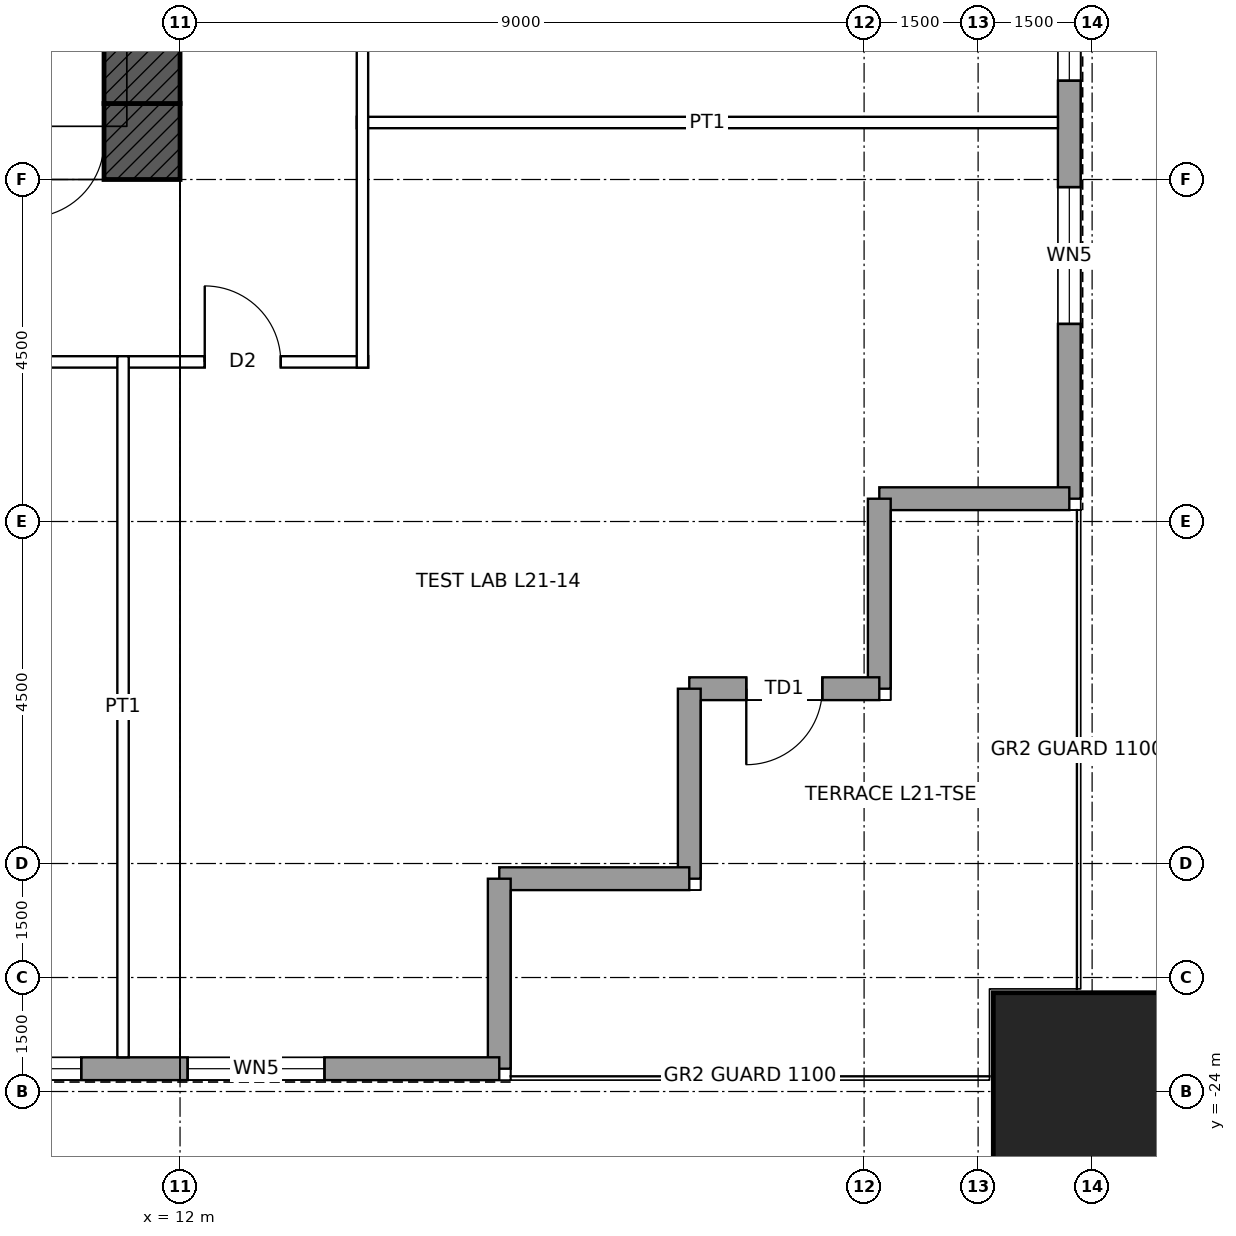
"""IFC4 building model, lengths in metres.
Left out: names, types, materials, properties, quantities, classifications, styles, units other than length and angle.
Written with IfcOpenShell. Run it as: python <this file> out.ifc"""

import sys

from ifc_helpers import new_model, si_unit, direction, frame, frame_2d, origin, origin_2d, place, context, subcontext, project, spatial, rectangle, hollow_rectangle, extrude, element, fill, save


model = new_model("IFC4")
c1 = context("Model", 3, precision=1e-05, world=origin(), true_north=direction((0.0, 1.0)))
c2 = subcontext(c1, "Body", "Model", "MODEL_VIEW")
j1 = project(units=[si_unit("LENGTHUNIT", "METRE"), si_unit("PLANEANGLEUNIT", "RADIAN")], contexts=[c1])
p1 = place(None, origin())
s1 = spatial("IfcSite", under=j1, at=p1, CompositionType="ELEMENT")
p2 = place(p1, origin())
s2 = spatial("IfcBuilding", under=s1, at=p2, CompositionType="ELEMENT")
p3 = place(p2, frame((0.0, 0.0, 108.9)))
s3 = spatial("IfcBuildingStorey", under=s2, at=p3, CompositionType="ELEMENT", Elevation=108.9)
p4 = place(p3, frame((24.0, -24.0, 0.0), z_axis=(0.0, 0.0, 1.0), x_axis=(1.0, 0.0, 0.0)))
e1 = element("IfcColumn", 1, at=p4, inside=s3, PredefinedType="COLUMN", context=c2, shape_type="SweptSolid", body=[
    extrude(hollow_rectangle(XDim=2.6, YDim=2.6, WallThickness=0.13, at=origin_2d()), origin(), (0.0, 0.0, 1.0), 4.5),
])
p5 = place(p3, frame((12.0, -11.5, 0.0), z_axis=(0.0, 0.0, 1.0), x_axis=(-1.0, 0.0, 0.0)))
e2 = element("IfcWall", 2, at=p5, inside=s3, PredefinedType="SHEAR", context=c2, shape_type="SweptSolid", body=[
    extrude(rectangle(XDim=24.0, YDim=1.0, at=frame_2d((12.0, 0.0))), origin(), (0.0, 0.0, 1.0), 4.5),
])
p6 = place(p5, frame((11.5, 0.0, 0.0)))
e3 = element("IfcOpeningElement", 3, at=p6, cuts=e2, PredefinedType="OPENING", context=c2, shape_type="SweptSolid", body=[
    extrude(rectangle(XDim=1.0, YDim=2.1, at=frame_2d((0.5, 1.05))), frame((0.0, 0.51, 0.0), z_axis=(0.0, -1.0, 0.0), x_axis=(1.0, 0.0, 0.0)), (0.0, 0.0, 1.0), 1.02),
])
p7 = place(p5, frame((1.0, 0.0, 0.0)))
e4 = element("IfcOpeningElement", 4, at=p7, cuts=e2, PredefinedType="OPENING", context=c2, shape_type="SweptSolid", body=[
    extrude(rectangle(XDim=1.0, YDim=2.4, at=frame_2d((0.5, 1.2))), frame((0.0, 0.51, 0.0), z_axis=(0.0, -1.0, 0.0), x_axis=(1.0, 0.0, 0.0)), (0.0, 0.0, 1.0), 1.02),
])
p8 = place(p3, frame((11.5, 11.0, 0.0), z_axis=(0.0, 0.0, 1.0), x_axis=(0.0, -1.0, 0.0)))
e5 = element("IfcWall", 5, at=p8, inside=s3, PredefinedType="SHEAR", context=c2, shape_type="SweptSolid", body=[
    extrude(rectangle(XDim=22.0, YDim=1.0, at=frame_2d((11.0, 0.0))), origin(), (0.0, 0.0, 1.0), 4.5),
])
p9 = place(p8, frame((10.5, 0.0, 0.0)))
e6 = element("IfcOpeningElement", 6, at=p9, cuts=e5, PredefinedType="OPENING", context=c2, shape_type="SweptSolid", body=[
    extrude(rectangle(XDim=1.0, YDim=2.4, at=frame_2d((0.5, 1.2))), frame((0.0, 0.51, 0.0), z_axis=(0.0, -1.0, 0.0), x_axis=(1.0, 0.0, 0.0)), (0.0, 0.0, 1.0), 1.02),
])
p10 = place(p3, frame((23.7, 16.2, 0.0), z_axis=(0.0, 0.0, 1.0), x_axis=(0.0, -1.0, 0.0)))
e7 = element("IfcWall", 7, at=p10, inside=s3, PredefinedType="SOLIDWALL", context=c2, shape_type="SweptSolid", body=[
    extrude(rectangle(XDim=32.4, YDim=0.3, at=frame_2d((16.2, 0.0))), origin(), (0.0, 0.0, 1.0), 4.3),
])
p11 = place(p10, frame((2.3, 0.0, 1.0)))
e8 = element("IfcOpeningElement", 8, at=p11, cuts=e7, PredefinedType="OPENING", context=c2, shape_type="SweptSolid", body=[
    extrude(rectangle(XDim=1.8, YDim=1.2, at=frame_2d((0.9, 0.6))), frame((0.0, 0.16, 0.0), z_axis=(0.0, -1.0, 0.0), x_axis=(1.0, 0.0, 0.0)), (0.0, 0.0, 1.0), 0.32),
])
p12 = place(p10, frame((5.5, 0.0, 1.0)))
e9 = element("IfcOpeningElement", 9, at=p12, cuts=e7, PredefinedType="OPENING", context=c2, shape_type="SweptSolid", body=[
    extrude(rectangle(XDim=2.4, YDim=1.2, at=frame_2d((1.2, 0.6))), frame((0.0, 0.16, 0.0), z_axis=(0.0, -1.0, 0.0), x_axis=(1.0, 0.0, 0.0)), (0.0, 0.0, 1.0), 0.32),
])
p13 = place(p10, frame((9.5, 0.0, 1.0)))
e10 = element("IfcOpeningElement", 10, at=p13, cuts=e7, PredefinedType="OPENING", context=c2, shape_type="SweptSolid", body=[
    extrude(rectangle(XDim=2.4, YDim=1.2, at=frame_2d((1.2, 0.6))), frame((0.0, 0.16, 0.0), z_axis=(0.0, -1.0, 0.0), x_axis=(1.0, 0.0, 0.0)), (0.0, 0.0, 1.0), 0.32),
])
p14 = place(p10, frame((13.0, 0.0, 1.0)))
e11 = element("IfcOpeningElement", 11, at=p14, cuts=e7, PredefinedType="OPENING", context=c2, shape_type="SweptSolid", body=[
    extrude(rectangle(XDim=2.4, YDim=1.2, at=frame_2d((1.2, 0.6))), frame((0.0, 0.16, 0.0), z_axis=(0.0, -1.0, 0.0), x_axis=(1.0, 0.0, 0.0)), (0.0, 0.0, 1.0), 0.32),
])
p15 = place(p10, frame((17.0, 0.0, 1.0)))
e12 = element("IfcOpeningElement", 12, at=p15, cuts=e7, PredefinedType="OPENING", context=c2, shape_type="SweptSolid", body=[
    extrude(rectangle(XDim=2.4, YDim=1.2, at=frame_2d((1.2, 0.6))), frame((0.0, 0.16, 0.0), z_axis=(0.0, -1.0, 0.0), x_axis=(1.0, 0.0, 0.0)), (0.0, 0.0, 1.0), 0.32),
])
p16 = place(p10, frame((20.5, 0.0, 1.0)))
e13 = element("IfcOpeningElement", 13, at=p16, cuts=e7, PredefinedType="OPENING", context=c2, shape_type="SweptSolid", body=[
    extrude(rectangle(XDim=2.4, YDim=1.2, at=frame_2d((1.2, 0.6))), frame((0.0, 0.16, 0.0), z_axis=(0.0, -1.0, 0.0), x_axis=(1.0, 0.0, 0.0)), (0.0, 0.0, 1.0), 0.32),
])
p17 = place(p10, frame((24.5, 0.0, 1.0)))
e14 = element("IfcOpeningElement", 14, at=p17, cuts=e7, PredefinedType="OPENING", context=c2, shape_type="SweptSolid", body=[
    extrude(rectangle(XDim=2.4, YDim=1.2, at=frame_2d((1.2, 0.6))), frame((0.0, 0.16, 0.0), z_axis=(0.0, -1.0, 0.0), x_axis=(1.0, 0.0, 0.0)), (0.0, 0.0, 1.0), 0.32),
])
p18 = place(p10, frame((28.3, 0.0, 1.0)))
e15 = element("IfcOpeningElement", 15, at=p18, cuts=e7, PredefinedType="OPENING", context=c2, shape_type="SweptSolid", body=[
    extrude(rectangle(XDim=1.8, YDim=1.2, at=frame_2d((0.9, 0.6))), frame((0.0, 0.16, 0.0), z_axis=(0.0, -1.0, 0.0), x_axis=(1.0, 0.0, 0.0)), (0.0, 0.0, 1.0), 0.32),
])
for number, where, z_axis, x_axis in (
    (16, (23.7, -16.2, 0.0), (0.0, 0.0, 1.0), (-1.0, 0.0, 0.0)),
    (17, (21.2, -16.2, 0.0), (0.0, 0.0, 1.0), (0.0, -1.0, 0.0)),
):
    element("IfcWall", number, at=place(p3, frame(where, z_axis=z_axis, x_axis=x_axis)), inside=s3, PredefinedType="SOLIDWALL", context=c2, shape_type="SweptSolid", body=[
        extrude(rectangle(XDim=2.5, YDim=0.3, at=frame_2d((1.25, 0.0))), origin(), (0.0, 0.0, 1.0), 4.3),
    ])
p19 = place(p3, frame((21.2, -18.7, 0.0), z_axis=(0.0, 0.0, 1.0), x_axis=(-1.0, 0.0, 0.0)))
e18 = element("IfcWall", 18, at=p19, inside=s3, PredefinedType="SOLIDWALL", context=c2, shape_type="SweptSolid", body=[
    extrude(rectangle(XDim=2.5, YDim=0.3, at=frame_2d((1.25, 0.0))), origin(), (0.0, 0.0, 1.0), 4.3),
])
p20 = place(p19, frame((0.75, 0.0, 0.0)))
e19 = element("IfcOpeningElement", 19, at=p20, cuts=e18, PredefinedType="OPENING", context=c2, shape_type="SweptSolid", body=[
    extrude(rectangle(XDim=1.0, YDim=2.4, at=frame_2d((0.5, 1.2))), frame((0.0, 0.16, 0.0), z_axis=(0.0, -1.0, 0.0), x_axis=(1.0, 0.0, 0.0)), (0.0, 0.0, 1.0), 0.32),
])
for number, where, z_axis, x_axis in (
    (20, (18.7, -18.7, 0.0), (0.0, 0.0, 1.0), (0.0, -1.0, 0.0)),
    (21, (18.7, -21.2, 0.0), (0.0, 0.0, 1.0), (-1.0, 0.0, 0.0)),
    (22, (16.2, -21.2, 0.0), (0.0, 0.0, 1.0), (0.0, -1.0, 0.0)),
):
    element("IfcWall", number, at=place(p3, frame(where, z_axis=z_axis, x_axis=x_axis)), inside=s3, PredefinedType="SOLIDWALL", context=c2, shape_type="SweptSolid", body=[
        extrude(rectangle(XDim=2.5, YDim=0.3, at=frame_2d((1.25, 0.0))), origin(), (0.0, 0.0, 1.0), 4.3),
    ])
p21 = place(p3, frame((16.2, -23.7, 0.0), z_axis=(0.0, 0.0, 1.0), x_axis=(-1.0, 0.0, 0.0)))
e23 = element("IfcWall", 23, at=p21, inside=s3, PredefinedType="SOLIDWALL", context=c2, shape_type="SweptSolid", body=[
    extrude(rectangle(XDim=32.4, YDim=0.3, at=frame_2d((16.2, 0.0))), origin(), (0.0, 0.0, 1.0), 4.3),
])
p22 = place(p21, frame((2.3, 0.0, 1.0)))
e24 = element("IfcOpeningElement", 24, at=p22, cuts=e23, PredefinedType="OPENING", context=c2, shape_type="SweptSolid", body=[
    extrude(rectangle(XDim=1.8, YDim=1.2, at=frame_2d((0.9, 0.6))), frame((0.0, 0.16, 0.0), z_axis=(0.0, -1.0, 0.0), x_axis=(1.0, 0.0, 0.0)), (0.0, 0.0, 1.0), 0.32),
])
p23 = place(p21, frame((5.5, 0.0, 1.0)))
e25 = element("IfcOpeningElement", 25, at=p23, cuts=e23, PredefinedType="OPENING", context=c2, shape_type="SweptSolid", body=[
    extrude(rectangle(XDim=2.4, YDim=1.2, at=frame_2d((1.2, 0.6))), frame((0.0, 0.16, 0.0), z_axis=(0.0, -1.0, 0.0), x_axis=(1.0, 0.0, 0.0)), (0.0, 0.0, 1.0), 0.32),
])
p24 = place(p21, frame((9.5, 0.0, 1.0)))
e26 = element("IfcOpeningElement", 26, at=p24, cuts=e23, PredefinedType="OPENING", context=c2, shape_type="SweptSolid", body=[
    extrude(rectangle(XDim=2.4, YDim=1.2, at=frame_2d((1.2, 0.6))), frame((0.0, 0.16, 0.0), z_axis=(0.0, -1.0, 0.0), x_axis=(1.0, 0.0, 0.0)), (0.0, 0.0, 1.0), 0.32),
])
p25 = place(p21, frame((13.0, 0.0, 1.0)))
e27 = element("IfcOpeningElement", 27, at=p25, cuts=e23, PredefinedType="OPENING", context=c2, shape_type="SweptSolid", body=[
    extrude(rectangle(XDim=2.4, YDim=1.2, at=frame_2d((1.2, 0.6))), frame((0.0, 0.16, 0.0), z_axis=(0.0, -1.0, 0.0), x_axis=(1.0, 0.0, 0.0)), (0.0, 0.0, 1.0), 0.32),
])
p26 = place(p21, frame((17.0, 0.0, 1.0)))
e28 = element("IfcOpeningElement", 28, at=p26, cuts=e23, PredefinedType="OPENING", context=c2, shape_type="SweptSolid", body=[
    extrude(rectangle(XDim=2.4, YDim=1.2, at=frame_2d((1.2, 0.6))), frame((0.0, 0.16, 0.0), z_axis=(0.0, -1.0, 0.0), x_axis=(1.0, 0.0, 0.0)), (0.0, 0.0, 1.0), 0.32),
])
p27 = place(p21, frame((20.5, 0.0, 1.0)))
e29 = element("IfcOpeningElement", 29, at=p27, cuts=e23, PredefinedType="OPENING", context=c2, shape_type="SweptSolid", body=[
    extrude(rectangle(XDim=2.4, YDim=1.2, at=frame_2d((1.2, 0.6))), frame((0.0, 0.16, 0.0), z_axis=(0.0, -1.0, 0.0), x_axis=(1.0, 0.0, 0.0)), (0.0, 0.0, 1.0), 0.32),
])
p28 = place(p21, frame((24.5, 0.0, 1.0)))
e30 = element("IfcOpeningElement", 30, at=p28, cuts=e23, PredefinedType="OPENING", context=c2, shape_type="SweptSolid", body=[
    extrude(rectangle(XDim=2.4, YDim=1.2, at=frame_2d((1.2, 0.6))), frame((0.0, 0.16, 0.0), z_axis=(0.0, -1.0, 0.0), x_axis=(1.0, 0.0, 0.0)), (0.0, 0.0, 1.0), 0.32),
])
p29 = place(p21, frame((28.3, 0.0, 1.0)))
e31 = element("IfcOpeningElement", 31, at=p29, cuts=e23, PredefinedType="OPENING", context=c2, shape_type="SweptSolid", body=[
    extrude(rectangle(XDim=1.8, YDim=1.2, at=frame_2d((0.9, 0.6))), frame((0.0, 0.16, 0.0), z_axis=(0.0, -1.0, 0.0), x_axis=(1.0, 0.0, 0.0)), (0.0, 0.0, 1.0), 0.32),
])
p30 = place(p3, frame((-14.475, -14.4, 0.0), z_axis=(0.0, 0.0, 1.0), x_axis=(1.0, 0.0, 0.0)))
e32 = element("IfcWall", 32, at=p30, inside=s3, PredefinedType="PARTITIONING", context=c2, shape_type="SweptSolid", body=[
    extrude(rectangle(XDim=28.95, YDim=0.15, at=frame_2d((14.475, 0.0))), origin(), (0.0, 0.0, 1.0), 4.3),
])
p31 = place(p30, frame((21.075, 0.0, 0.0)))
e33 = element("IfcOpeningElement", 33, at=p31, cuts=e32, PredefinedType="OPENING", context=c2, shape_type="SweptSolid", body=[
    extrude(rectangle(XDim=1.8, YDim=2.4, at=frame_2d((0.9, 1.2))), frame((0.0, 0.085, 0.0), z_axis=(0.0, -1.0, 0.0), x_axis=(1.0, 0.0, 0.0)), (0.0, 0.0, 1.0), 0.17),
])
p32 = place(p30, frame((13.575, 0.0, 0.0)))
e34 = element("IfcOpeningElement", 34, at=p32, cuts=e32, PredefinedType="OPENING", context=c2, shape_type="SweptSolid", body=[
    extrude(rectangle(XDim=1.8, YDim=2.4, at=frame_2d((0.9, 1.2))), frame((0.0, 0.085, 0.0), z_axis=(0.0, -1.0, 0.0), x_axis=(1.0, 0.0, 0.0)), (0.0, 0.0, 1.0), 0.17),
])
p33 = place(p30, frame((6.475, 0.0, 0.0)))
e35 = element("IfcOpeningElement", 35, at=p33, cuts=e32, PredefinedType="OPENING", context=c2, shape_type="SweptSolid", body=[
    extrude(rectangle(XDim=1.0, YDim=2.1, at=frame_2d((0.5, 1.05))), frame((0.0, 0.085, 0.0), z_axis=(0.0, -1.0, 0.0), x_axis=(1.0, 0.0, 0.0)), (0.0, 0.0, 1.0), 0.17),
])
p34 = place(p30, frame((26.8, 0.0, 0.0)))
e36 = element("IfcOpeningElement", 36, at=p34, cuts=e32, PredefinedType="OPENING", context=c2, shape_type="SweptSolid", body=[
    extrude(rectangle(XDim=1.0, YDim=2.1, at=frame_2d((0.5, 1.05))), frame((0.0, 0.085, 0.0), z_axis=(0.0, -1.0, 0.0), x_axis=(1.0, 0.0, 0.0)), (0.0, 0.0, 1.0), 0.17),
])
p35 = place(p30, frame((1.15, 0.0, 0.0)))
e37 = element("IfcOpeningElement", 37, at=p35, cuts=e32, PredefinedType="OPENING", context=c2, shape_type="SweptSolid", body=[
    extrude(rectangle(XDim=1.0, YDim=2.1, at=frame_2d((0.5, 1.05))), frame((0.0, 0.085, 0.0), z_axis=(0.0, -1.0, 0.0), x_axis=(1.0, 0.0, 0.0)), (0.0, 0.0, 1.0), 0.17),
])
for number, where, z_axis, x_axis in (
    (38, (14.325, -11.25, 0.0), (0.0, 0.0, 1.0), (1.0, 0.0, 0.0)),
    (39, (11.25, -23.55, 0.0), (0.0, 0.0, 1.0), (0.0, 1.0, 0.0)),
):
    element("IfcWall", number, at=place(p3, frame(where, z_axis=z_axis, x_axis=x_axis)), inside=s3, PredefinedType="PARTITIONING", context=c2, shape_type="SweptSolid", body=[
        extrude(rectangle(XDim=9.225, YDim=0.15, at=frame_2d((4.613, 0.0))), origin(), (0.0, 0.0, 1.0), 3.431),
    ])
p36 = place(p3, frame((14.4, -14.475, 0.0), z_axis=(0.0, 0.0, 1.0), x_axis=(0.0, 1.0, 0.0)))
e40 = element("IfcWall", 40, at=p36, inside=s3, PredefinedType="PARTITIONING", context=c2, shape_type="SweptSolid", body=[
    extrude(rectangle(XDim=28.95, YDim=0.15, at=frame_2d((14.475, 0.0))), origin(), (0.0, 0.0, 1.0), 4.3),
])
p37 = place(p36, frame((19.2, 0.0, 0.0)))
e41 = element("IfcOpeningElement", 41, at=p37, cuts=e40, PredefinedType="OPENING", context=c2, shape_type="SweptSolid", body=[
    extrude(rectangle(XDim=1.8, YDim=2.4, at=frame_2d((0.9, 1.2))), frame((0.0, 0.085, 0.0), z_axis=(0.0, -1.0, 0.0), x_axis=(1.0, 0.0, 0.0)), (0.0, 0.0, 1.0), 0.17),
])
p38 = place(p36, frame((7.95, 0.0, 0.0)))
e42 = element("IfcOpeningElement", 42, at=p38, cuts=e40, PredefinedType="OPENING", context=c2, shape_type="SweptSolid", body=[
    extrude(rectangle(XDim=1.8, YDim=2.4, at=frame_2d((0.9, 1.2))), frame((0.0, 0.085, 0.0), z_axis=(0.0, -1.0, 0.0), x_axis=(1.0, 0.0, 0.0)), (0.0, 0.0, 1.0), 0.17),
])
p39 = place(p17, origin())
e43 = element("IfcWindow", 43, at=p39, inside=s3, PartitioningType="SINGLE_PANEL", PredefinedType="WINDOW", context=c2, shape_type="SweptSolid", body=[
    extrude(rectangle(XDim=2.4, YDim=1.2, at=frame_2d((1.2, 0.6))), frame((0.0, 0.03, 0.0), z_axis=(0.0, -1.0, 0.0), x_axis=(1.0, 0.0, 0.0)), (0.0, 0.0, 1.0), 0.06),
])
fill(e14, e43)
p40 = place(p18, origin())
e44 = element("IfcWindow", 44, at=p40, inside=s3, PartitioningType="SINGLE_PANEL", PredefinedType="WINDOW", context=c2, shape_type="SweptSolid", body=[
    extrude(rectangle(XDim=1.8, YDim=1.2, at=frame_2d((0.9, 0.6))), frame((0.0, 0.03, 0.0), z_axis=(0.0, -1.0, 0.0), x_axis=(1.0, 0.0, 0.0)), (0.0, 0.0, 1.0), 0.06),
])
fill(e15, e44)
p41 = place(p20, origin())
e45 = element("IfcDoor", 45, at=p41, inside=s3, OperationType="SINGLE_SWING_RIGHT", PredefinedType="DOOR", context=c2, shape_type="SweptSolid", body=[
    extrude(rectangle(XDim=1.0, YDim=2.4, at=frame_2d((0.5, 1.2))), frame((0.0, 0.025, 0.0), z_axis=(0.0, -1.0, 0.0), x_axis=(1.0, 0.0, 0.0)), (0.0, 0.0, 1.0), 0.05),
])
fill(e19, e45)
p42 = place(p22, origin())
e46 = element("IfcWindow", 46, at=p42, inside=s3, PartitioningType="SINGLE_PANEL", PredefinedType="WINDOW", context=c2, shape_type="SweptSolid", body=[
    extrude(rectangle(XDim=1.8, YDim=1.2, at=frame_2d((0.9, 0.6))), frame((0.0, 0.03, 0.0), z_axis=(0.0, -1.0, 0.0), x_axis=(1.0, 0.0, 0.0)), (0.0, 0.0, 1.0), 0.06),
])
fill(e24, e46)
p43 = place(p23, origin())
e47 = element("IfcWindow", 47, at=p43, inside=s3, PartitioningType="SINGLE_PANEL", PredefinedType="WINDOW", context=c2, shape_type="SweptSolid", body=[
    extrude(rectangle(XDim=2.4, YDim=1.2, at=frame_2d((1.2, 0.6))), frame((0.0, 0.03, 0.0), z_axis=(0.0, -1.0, 0.0), x_axis=(1.0, 0.0, 0.0)), (0.0, 0.0, 1.0), 0.06),
])
fill(e25, e47)
p44 = place(p7, origin())
e48 = element("IfcDoor", 48, at=p44, inside=s3, OperationType="SINGLE_SWING_RIGHT", PredefinedType="DOOR", context=c2, shape_type="SweptSolid", body=[
    extrude(rectangle(XDim=1.0, YDim=2.4, at=frame_2d((0.5, 1.2))), frame((0.0, 0.485, 0.0), z_axis=(0.0, -1.0, 0.0), x_axis=(1.0, 0.0, 0.0)), (0.0, 0.0, 1.0), 0.05),
])
fill(e4, e48)
p45 = place(p34, origin())
e49 = element("IfcDoor", 49, at=p45, inside=s3, OperationType="SINGLE_SWING_LEFT", PredefinedType="DOOR", context=c2, shape_type="SweptSolid", body=[
    extrude(rectangle(XDim=1.0, YDim=2.1, at=frame_2d((0.5, 1.05))), frame((0.0, 0.025, 0.0), z_axis=(0.0, -1.0, 0.0), x_axis=(1.0, 0.0, 0.0)), (0.0, 0.0, 1.0), 0.05),
])
fill(e36, e49)
save(model, sys.argv[1])
